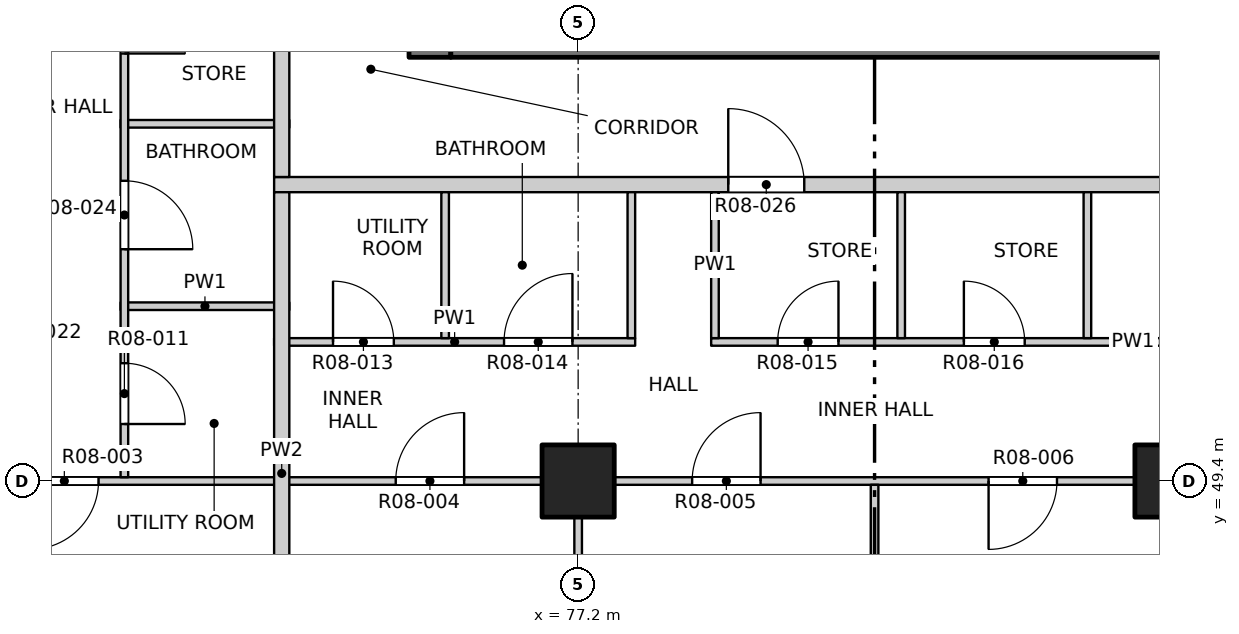
"""IFC4 building model, lengths in metres.
Left out: names, types, materials, properties, quantities, classifications, styles, units other than length and angle.
Written with IfcOpenShell. Run it as: python <this file> out.ifc"""

import sys

from ifc_helpers import new_model, si_unit, direction, frame, frame_2d, origin, origin_2d, place, context, subcontext, project, spatial, rectangle, extrude, element, fill, save


model = new_model("IFC4")
c1 = context("Model", 3, precision=1e-05, world=origin(), true_north=direction((0.0, 1.0)))
c2 = subcontext(c1, "Body", "Model", "MODEL_VIEW")
j1 = project(units=[si_unit("LENGTHUNIT", "METRE"), si_unit("PLANEANGLEUNIT", "RADIAN")], contexts=[c1])
p1 = place(None, origin())
s1 = spatial("IfcSite", under=j1, at=p1, CompositionType="ELEMENT")
p2 = place(p1, origin())
s2 = spatial("IfcBuilding", under=s1, at=p2, CompositionType="ELEMENT")
p3 = place(p2, frame((0.0, 0.0, 103.3)))
s3 = spatial("IfcBuildingStorey", under=s2, at=p3, CompositionType="ELEMENT", Elevation=103.3)
for number, where, z_axis, x_axis in (
    (1, (77.2, 49.4, -0.25), (0.0, 0.0, 1.0), (1.0, 0.0, 0.0)),
    (2, (85.0, 49.4, -0.25), (0.0, 0.0, 1.0), (1.0, 0.0, 0.0)),
):
    element("IfcColumn", number, at=place(p3, frame(where, z_axis=z_axis, x_axis=x_axis)), inside=s3, PredefinedType="COLUMN", context=c2, shape_type="SweptSolid", body=[
        extrude(rectangle(XDim=0.95, YDim=0.95, at=origin_2d()), origin(), (0.0, 0.0, 1.0), 3.4),
    ])
p4 = place(p3, frame((75.25, 54.975, -0.25), z_axis=(0.0, 0.0, 1.0), x_axis=(0.0, 1.0, 0.0)))
e3 = element("IfcWall", 3, at=p4, inside=s3, PredefinedType="SOLIDWALL", context=c2, shape_type="SweptSolid", body=[
    extrude(rectangle(XDim=22.325, YDim=0.55, at=frame_2d((11.163, 0.0))), origin(), (0.0, 0.0, 1.0), 3.4),
])
p5 = place(p4, frame((7.475, 0.0, 0.25)))
e4 = element("IfcOpeningElement", 4, at=p5, cuts=e3, PredefinedType="OPENING", context=c2, shape_type="SweptSolid", body=[
    extrude(rectangle(XDim=0.9, YDim=2.1, at=frame_2d((0.45, 1.05))), frame((0.0, 0.285, 0.0), z_axis=(0.0, -1.0, 0.0), x_axis=(1.0, 0.0, 0.0)), (0.0, 0.0, 1.0), 0.57),
])
p6 = place(p4, frame((10.775, 0.0, 0.25)))
e5 = element("IfcOpeningElement", 5, at=p6, cuts=e3, PredefinedType="OPENING", context=c2, shape_type="SweptSolid", body=[
    extrude(rectangle(XDim=0.9, YDim=2.1, at=frame_2d((0.45, 1.05))), frame((0.0, 0.285, 0.0), z_axis=(0.0, -1.0, 0.0), x_axis=(1.0, 0.0, 0.0)), (0.0, 0.0, 1.0), 0.57),
])
p7 = place(p4, frame((13.775, 0.0, 0.25)))
e6 = element("IfcOpeningElement", 6, at=p7, cuts=e3, PredefinedType="OPENING", context=c2, shape_type="SweptSolid", body=[
    extrude(rectangle(XDim=0.9, YDim=2.1, at=frame_2d((0.45, 1.05))), frame((0.0, 0.285, 0.0), z_axis=(0.0, -1.0, 0.0), x_axis=(1.0, 0.0, 0.0)), (0.0, 0.0, 1.0), 0.57),
])
p8 = place(p4, frame((16.775, 0.0, 0.25)))
e7 = element("IfcOpeningElement", 7, at=p8, cuts=e3, PredefinedType="OPENING", context=c2, shape_type="SweptSolid", body=[
    extrude(rectangle(XDim=0.9, YDim=2.1, at=frame_2d((0.45, 1.05))), frame((0.0, 0.285, 0.0), z_axis=(0.0, -1.0, 0.0), x_axis=(1.0, 0.0, 0.0)), (0.0, 0.0, 1.0), 0.57),
])
p9 = place(p4, frame((20.075, 0.0, 0.25)))
e8 = element("IfcOpeningElement", 8, at=p9, cuts=e3, PredefinedType="OPENING", context=c2, shape_type="SweptSolid", body=[
    extrude(rectangle(XDim=0.9, YDim=2.1, at=frame_2d((0.45, 1.05))), frame((0.0, 0.285, 0.0), z_axis=(0.0, -1.0, 0.0), x_axis=(1.0, 0.0, 0.0)), (0.0, 0.0, 1.0), 0.57),
])
p10 = place(p3, frame((75.525, 55.25, -0.25), z_axis=(0.0, 0.0, 1.0), x_axis=(1.0, 0.0, 0.0)))
e9 = element("IfcWall", 9, at=p10, inside=s3, PredefinedType="SOLIDWALL", context=c2, shape_type="SweptSolid", body=[
    extrude(rectangle(XDim=18.95, YDim=0.55, at=frame_2d((9.475, 0.0))), origin(), (0.0, 0.0, 1.0), 3.4),
])
p11 = place(p10, frame((8.725, 0.0, 0.25)))
e10 = element("IfcOpeningElement", 10, at=p11, cuts=e9, PredefinedType="OPENING", context=c2, shape_type="SweptSolid", body=[
    extrude(rectangle(XDim=1.5, YDim=2.1, at=frame_2d((0.75, 1.05))), frame((0.0, 0.285, 0.0), z_axis=(0.0, -1.0, 0.0), x_axis=(1.0, 0.0, 0.0)), (0.0, 0.0, 1.0), 0.57),
])
p12 = place(p3, frame((65.8, 49.4, 0.0), z_axis=(0.0, 0.0, 1.0), x_axis=(1.0, 0.0, 0.0)))
e11 = element("IfcWall", 11, at=p12, inside=s3, PredefinedType="PARTITIONING", context=c2, shape_type="SweptSolid", body=[
    extrude(rectangle(XDim=38.4, YDim=0.1, at=frame_2d((19.2, 0.0))), origin(), (0.0, 0.0, 1.0), 3.15),
])
p13 = place(p12, frame((4.19, 0.0, 0.0)))
e12 = element("IfcOpeningElement", 12, at=p13, cuts=e11, PredefinedType="OPENING", context=c2, shape_type="SweptSolid", body=[
    extrude(rectangle(XDim=0.9, YDim=2.1, at=frame_2d((0.45, 1.05))), frame((0.0, 0.06, 0.0), z_axis=(0.0, -1.0, 0.0), x_axis=(1.0, 0.0, 0.0)), (0.0, 0.0, 1.0), 0.12),
])
p14 = place(p12, frame((9.0, 0.0, 0.0)))
e13 = element("IfcOpeningElement", 13, at=p14, cuts=e11, PredefinedType="OPENING", context=c2, shape_type="SweptSolid", body=[
    extrude(rectangle(XDim=0.9, YDim=2.1, at=frame_2d((0.45, 1.05))), frame((0.0, 0.06, 0.0), z_axis=(0.0, -1.0, 0.0), x_axis=(1.0, 0.0, 0.0)), (0.0, 0.0, 1.0), 0.12),
])
p15 = place(p12, frame((12.9, 0.0, 0.0)))
e14 = element("IfcOpeningElement", 14, at=p15, cuts=e11, PredefinedType="OPENING", context=c2, shape_type="SweptSolid", body=[
    extrude(rectangle(XDim=0.9, YDim=2.1, at=frame_2d((0.45, 1.05))), frame((0.0, 0.06, 0.0), z_axis=(0.0, -1.0, 0.0), x_axis=(1.0, 0.0, 0.0)), (0.0, 0.0, 1.0), 0.12),
])
p16 = place(p12, frame((16.8, 0.0, 0.0)))
e15 = element("IfcOpeningElement", 15, at=p16, cuts=e11, PredefinedType="OPENING", context=c2, shape_type="SweptSolid", body=[
    extrude(rectangle(XDim=0.9, YDim=2.1, at=frame_2d((0.45, 1.05))), frame((0.0, 0.06, 0.0), z_axis=(0.0, -1.0, 0.0), x_axis=(1.0, 0.0, 0.0)), (0.0, 0.0, 1.0), 0.12),
])
p17 = place(p12, frame((20.7, 0.0, 0.0)))
e16 = element("IfcOpeningElement", 16, at=p17, cuts=e11, PredefinedType="OPENING", context=c2, shape_type="SweptSolid", body=[
    extrude(rectangle(XDim=0.9, YDim=2.1, at=frame_2d((0.45, 1.05))), frame((0.0, 0.06, 0.0), z_axis=(0.0, -1.0, 0.0), x_axis=(1.0, 0.0, 0.0)), (0.0, 0.0, 1.0), 0.12),
])
p18 = place(p12, frame((24.6, 0.0, 0.0)))
e17 = element("IfcOpeningElement", 17, at=p18, cuts=e11, PredefinedType="OPENING", context=c2, shape_type="SweptSolid", body=[
    extrude(rectangle(XDim=0.9, YDim=2.1, at=frame_2d((0.45, 1.05))), frame((0.0, 0.06, 0.0), z_axis=(0.0, -1.0, 0.0), x_axis=(1.0, 0.0, 0.0)), (0.0, 0.0, 1.0), 0.12),
])
p19 = place(p12, frame((28.5, 0.0, 0.0)))
e18 = element("IfcOpeningElement", 18, at=p19, cuts=e11, PredefinedType="OPENING", context=c2, shape_type="SweptSolid", body=[
    extrude(rectangle(XDim=0.9, YDim=2.1, at=frame_2d((0.45, 1.05))), frame((0.0, 0.06, 0.0), z_axis=(0.0, -1.0, 0.0), x_axis=(1.0, 0.0, 0.0)), (0.0, 0.0, 1.0), 0.12),
])
p20 = place(p12, frame((33.31, 0.0, 0.0)))
e19 = element("IfcOpeningElement", 19, at=p20, cuts=e11, PredefinedType="OPENING", context=c2, shape_type="SweptSolid", body=[
    extrude(rectangle(XDim=0.9, YDim=2.1, at=frame_2d((0.45, 1.05))), frame((0.0, 0.06, 0.0), z_axis=(0.0, -1.0, 0.0), x_axis=(1.0, 0.0, 0.0)), (0.0, 0.0, 1.0), 0.12),
])
p21 = place(p3, frame((73.2, 51.23, 0.0), z_axis=(0.0, 0.0, 1.0), x_axis=(1.0, 0.0, 0.0)))
e20 = element("IfcWall", 20, at=p21, inside=s3, PredefinedType="PARTITIONING", context=c2, shape_type="SweptSolid", body=[
    extrude(rectangle(XDim=4.75, YDim=0.1, at=frame_2d((2.375, 0.0))), origin(), (0.0, 0.0, 1.0), 3.15),
])
p22 = place(p21, frame((0.775, 0.0, 0.0)))
e21 = element("IfcOpeningElement", 21, at=p22, cuts=e20, PredefinedType="OPENING", context=c2, shape_type="SweptSolid", body=[
    extrude(rectangle(XDim=0.8, YDim=2.1, at=frame_2d((0.4, 1.05))), frame((0.0, 0.06, 0.0), z_axis=(0.0, -1.0, 0.0), x_axis=(1.0, 0.0, 0.0)), (0.0, 0.0, 1.0), 0.12),
])
p23 = place(p21, frame((3.025, 0.0, 0.0)))
e22 = element("IfcOpeningElement", 22, at=p23, cuts=e20, PredefinedType="OPENING", context=c2, shape_type="SweptSolid", body=[
    extrude(rectangle(XDim=0.9, YDim=2.1, at=frame_2d((0.45, 1.05))), frame((0.0, 0.06, 0.0), z_axis=(0.0, -1.0, 0.0), x_axis=(1.0, 0.0, 0.0)), (0.0, 0.0, 1.0), 0.12),
])
p24 = place(p3, frame((78.95, 51.23, 0.0), z_axis=(0.0, 0.0, 1.0), x_axis=(1.0, 0.0, 0.0)))
e23 = element("IfcWall", 23, at=p24, inside=s3, PredefinedType="PARTITIONING", context=c2, shape_type="SweptSolid", body=[
    extrude(rectangle(XDim=11.1, YDim=0.1, at=frame_2d((5.55, 0.0))), origin(), (0.0, 0.0, 1.0), 3.15),
])
p25 = place(p24, frame((0.875, 0.0, 0.0)))
e24 = element("IfcOpeningElement", 24, at=p25, cuts=e23, PredefinedType="OPENING", context=c2, shape_type="SweptSolid", body=[
    extrude(rectangle(XDim=0.8, YDim=2.1, at=frame_2d((0.4, 1.05))), frame((0.0, 0.06, 0.0), z_axis=(0.0, -1.0, 0.0), x_axis=(1.0, 0.0, 0.0)), (0.0, 0.0, 1.0), 0.12),
])
p26 = place(p24, frame((3.325, 0.0, 0.0)))
e25 = element("IfcOpeningElement", 25, at=p26, cuts=e23, PredefinedType="OPENING", context=c2, shape_type="SweptSolid", body=[
    extrude(rectangle(XDim=0.8, YDim=2.1, at=frame_2d((0.4, 1.05))), frame((0.0, 0.06, 0.0), z_axis=(0.0, -1.0, 0.0), x_axis=(1.0, 0.0, 0.0)), (0.0, 0.0, 1.0), 0.12),
])
p27 = place(p24, frame((6.035, 0.0, 0.0)))
e26 = element("IfcOpeningElement", 26, at=p27, cuts=e23, PredefinedType="OPENING", context=c2, shape_type="SweptSolid", body=[
    extrude(rectangle(XDim=0.9, YDim=2.1, at=frame_2d((0.45, 1.05))), frame((0.0, 0.06, 0.0), z_axis=(0.0, -1.0, 0.0), x_axis=(1.0, 0.0, 0.0)), (0.0, 0.0, 1.0), 0.12),
])
p28 = place(p24, frame((8.535, 0.0, 0.0)))
e27 = element("IfcOpeningElement", 27, at=p28, cuts=e23, PredefinedType="OPENING", context=c2, shape_type="SweptSolid", body=[
    extrude(rectangle(XDim=0.9, YDim=2.1, at=frame_2d((0.45, 1.05))), frame((0.0, 0.06, 0.0), z_axis=(0.0, -1.0, 0.0), x_axis=(1.0, 0.0, 0.0)), (0.0, 0.0, 1.0), 0.12),
])
p29 = place(p24, frame((10.1, 0.0, 0.0)))
e28 = element("IfcOpeningElement", 28, at=p29, cuts=e23, PredefinedType="OPENING", context=c2, shape_type="SweptSolid", body=[
    extrude(rectangle(XDim=0.8, YDim=2.1, at=frame_2d((0.4, 1.05))), frame((0.0, 0.06, 0.0), z_axis=(0.0, -1.0, 0.0), x_axis=(1.0, 0.0, 0.0)), (0.0, 0.0, 1.0), 0.12),
])
p30 = place(p3, frame((71.18, 51.7, 0.0), z_axis=(0.0, 0.0, 1.0), x_axis=(1.0, 0.0, 0.0)))
e29 = element("IfcWall", 29, at=p30, inside=s3, PredefinedType="PARTITIONING", context=c2, shape_type="SweptSolid", body=[
    extrude(rectangle(XDim=2.22, YDim=0.1, at=frame_2d((1.11, 0.0))), origin(), (0.0, 0.0, 1.0), 3.15),
])
p31 = place(p3, frame((73.2, 53.3, 0.0), z_axis=(0.0, 0.0, 1.0), x_axis=(1.0, 0.0, 0.0)))
e30 = element("IfcWall", 30, at=p31, inside=s3, PredefinedType="PARTITIONING", context=c2, shape_type="SweptSolid", body=[
    extrude(rectangle(XDim=23.6, YDim=0.2, at=frame_2d((11.8, 0.0))), origin(), (0.0, 0.0, 1.0), 3.15),
])
p32 = place(p31, frame((5.975, 0.0, 0.0)))
e31 = element("IfcOpeningElement", 31, at=p32, cuts=e30, PredefinedType="OPENING", context=c2, shape_type="SweptSolid", body=[
    extrude(rectangle(XDim=1.0, YDim=2.1, at=frame_2d((0.5, 1.05))), frame((0.0, 0.11, 0.0), z_axis=(0.0, -1.0, 0.0), x_axis=(1.0, 0.0, 0.0)), (0.0, 0.0, 1.0), 0.22),
])
p33 = place(p31, frame((18.075, 0.0, 0.0)))
e32 = element("IfcOpeningElement", 32, at=p33, cuts=e30, PredefinedType="OPENING", context=c2, shape_type="SweptSolid", body=[
    extrude(rectangle(XDim=1.0, YDim=2.1, at=frame_2d((0.5, 1.05))), frame((0.0, 0.11, 0.0), z_axis=(0.0, -1.0, 0.0), x_axis=(1.0, 0.0, 0.0)), (0.0, 0.0, 1.0), 0.22),
])
p34 = place(p3, frame((71.18, 54.1, 0.0), z_axis=(0.0, 0.0, 1.0), x_axis=(1.0, 0.0, 0.0)))
e33 = element("IfcWall", 33, at=p34, inside=s3, PredefinedType="PARTITIONING", context=c2, shape_type="SweptSolid", body=[
    extrude(rectangle(XDim=2.22, YDim=0.1, at=frame_2d((1.11, 0.0))), origin(), (0.0, 0.0, 1.0), 3.15),
])
p35 = place(p3, frame((71.23, 49.45, 0.0), z_axis=(0.0, 0.0, 1.0), x_axis=(0.0, 1.0, 0.0)))
e34 = element("IfcWall", 34, at=p35, inside=s3, PredefinedType="PARTITIONING", context=c2, shape_type="SweptSolid", body=[
    extrude(rectangle(XDim=9.05, YDim=0.1, at=frame_2d((4.525, 0.0))), origin(), (0.0, 0.0, 1.0), 3.15),
])
p36 = place(p35, frame((0.7, 0.0, 0.0)))
e35 = element("IfcOpeningElement", 35, at=p36, cuts=e34, PredefinedType="OPENING", context=c2, shape_type="SweptSolid", body=[
    extrude(rectangle(XDim=0.8, YDim=2.1, at=frame_2d((0.4, 1.05))), frame((0.0, 0.06, 0.0), z_axis=(0.0, -1.0, 0.0), x_axis=(1.0, 0.0, 0.0)), (0.0, 0.0, 1.0), 0.12),
])
p37 = place(p35, frame((3.0, 0.0, 0.0)))
e36 = element("IfcOpeningElement", 36, at=p37, cuts=e34, PredefinedType="OPENING", context=c2, shape_type="SweptSolid", body=[
    extrude(rectangle(XDim=0.9, YDim=2.1, at=frame_2d((0.45, 1.05))), frame((0.0, 0.06, 0.0), z_axis=(0.0, -1.0, 0.0), x_axis=(1.0, 0.0, 0.0)), (0.0, 0.0, 1.0), 0.12),
])
p38 = place(p35, frame((5.575, 0.0, 0.0)))
e37 = element("IfcOpeningElement", 37, at=p38, cuts=e34, PredefinedType="OPENING", context=c2, shape_type="SweptSolid", body=[
    extrude(rectangle(XDim=0.8, YDim=2.1, at=frame_2d((0.4, 1.05))), frame((0.0, 0.06, 0.0), z_axis=(0.0, -1.0, 0.0), x_axis=(1.0, 0.0, 0.0)), (0.0, 0.0, 1.0), 0.12),
])
p39 = place(p35, frame((7.75, 0.0, 0.0)))
e38 = element("IfcOpeningElement", 38, at=p39, cuts=e34, PredefinedType="OPENING", context=c2, shape_type="SweptSolid", body=[
    extrude(rectangle(XDim=0.9, YDim=2.1, at=frame_2d((0.45, 1.05))), frame((0.0, 0.06, 0.0), z_axis=(0.0, -1.0, 0.0), x_axis=(1.0, 0.0, 0.0)), (0.0, 0.0, 1.0), 0.12),
])
p40 = place(p3, frame((73.3, 45.8, 0.0), z_axis=(0.0, 0.0, 1.0), x_axis=(0.0, 1.0, 0.0)))
e39 = element("IfcWall", 39, at=p40, inside=s3, PredefinedType="PARTITIONING", context=c2, shape_type="SweptSolid", body=[
    extrude(rectangle(XDim=7.4, YDim=0.2, at=frame_2d((3.7, 0.0))), origin(), (0.0, 0.0, 1.0), 3.15),
])
p41 = place(p3, frame((73.3, 53.4, 0.0), z_axis=(0.0, 0.0, 1.0), x_axis=(0.0, 1.0, 0.0)))
e40 = element("IfcWall", 40, at=p41, inside=s3, PredefinedType="PARTITIONING", context=c2, shape_type="SweptSolid", body=[
    extrude(rectangle(XDim=30.8, YDim=0.2, at=frame_2d((15.4, 0.0))), origin(), (0.0, 0.0, 1.0), 3.15),
])
p42 = place(p41, frame((6.425, 0.0, 0.0)))
e41 = element("IfcOpeningElement", 41, at=p42, cuts=e40, PredefinedType="OPENING", context=c2, shape_type="SweptSolid", body=[
    extrude(rectangle(XDim=1.0, YDim=2.1, at=frame_2d((0.5, 1.05))), frame((0.0, 0.11, 0.0), z_axis=(0.0, -1.0, 0.0), x_axis=(1.0, 0.0, 0.0)), (0.0, 0.0, 1.0), 0.22),
])
p43 = place(p41, frame((18.525, 0.0, 0.0)))
e42 = element("IfcOpeningElement", 42, at=p43, cuts=e40, PredefinedType="OPENING", context=c2, shape_type="SweptSolid", body=[
    extrude(rectangle(XDim=1.0, YDim=2.1, at=frame_2d((0.5, 1.05))), frame((0.0, 0.11, 0.0), z_axis=(0.0, -1.0, 0.0), x_axis=(1.0, 0.0, 0.0)), (0.0, 0.0, 1.0), 0.22),
])
p44 = place(p3, frame((75.45, 51.28, 0.0), z_axis=(0.0, 0.0, 1.0), x_axis=(0.0, 1.0, 0.0)))
e43 = element("IfcWall", 43, at=p44, inside=s3, PredefinedType="PARTITIONING", context=c2, shape_type="SweptSolid", body=[
    extrude(rectangle(XDim=1.92, YDim=0.1, at=frame_2d((0.96, 0.0))), origin(), (0.0, 0.0, 1.0), 3.15),
])
p45 = place(p3, frame((77.2, 45.8, 0.0), z_axis=(0.0, 0.0, 1.0), x_axis=(0.0, 1.0, 0.0)))
e44 = element("IfcWall", 44, at=p45, inside=s3, PredefinedType="PARTITIONING", context=c2, shape_type="SweptSolid", body=[
    extrude(rectangle(XDim=3.55, YDim=0.1, at=frame_2d((1.775, 0.0))), origin(), (0.0, 0.0, 1.0), 3.15),
])
for number, where, z_axis, x_axis in (
    (45, (77.9, 51.28, 0.0), (0.0, 0.0, 1.0), (0.0, 1.0, 0.0)),
    (46, (79.0, 51.28, 0.0), (0.0, 0.0, 1.0), (0.0, 1.0, 0.0)),
):
    element("IfcWall", number, at=place(p3, frame(where, z_axis=z_axis, x_axis=x_axis)), inside=s3, PredefinedType="PARTITIONING", context=c2, shape_type="SweptSolid", body=[
        extrude(rectangle(XDim=1.92, YDim=0.1, at=frame_2d((0.96, 0.0))), origin(), (0.0, 0.0, 1.0), 3.15),
    ])
p46 = place(p3, frame((81.1, 45.8, 0.0), z_axis=(0.0, 0.0, 1.0), x_axis=(0.0, 1.0, 0.0)))
e47 = element("IfcWall", 47, at=p46, inside=s3, PredefinedType="PARTITIONING", context=c2, shape_type="SweptSolid", body=[
    extrude(rectangle(XDim=3.55, YDim=0.1, at=frame_2d((1.775, 0.0))), origin(), (0.0, 0.0, 1.0), 2.55),
])
for number, where, z_axis, x_axis in (
    (48, (81.45, 51.28, 0.0), (0.0, 0.0, 1.0), (0.0, 1.0, 0.0)),
    (49, (83.9, 51.28, 0.0), (0.0, 0.0, 1.0), (0.0, 1.0, 0.0)),
):
    element("IfcWall", number, at=place(p3, frame(where, z_axis=z_axis, x_axis=x_axis)), inside=s3, PredefinedType="PARTITIONING", context=c2, shape_type="SweptSolid", body=[
        extrude(rectangle(XDim=1.92, YDim=0.1, at=frame_2d((0.96, 0.0))), origin(), (0.0, 0.0, 1.0), 3.15),
    ])
p47 = place(p13, origin())
e50 = element("IfcDoor", 50, at=p47, inside=s3, OperationType="SINGLE_SWING_RIGHT", PredefinedType="DOOR", context=c2, shape_type="SweptSolid", body=[
    extrude(rectangle(XDim=0.9, YDim=2.1, at=frame_2d((0.45, 1.05))), frame((0.0, 0.025, 0.0), z_axis=(0.0, -1.0, 0.0), x_axis=(1.0, 0.0, 0.0)), (0.0, 0.0, 1.0), 0.05),
])
fill(e12, e50)
p48 = place(p14, origin())
e51 = element("IfcDoor", 51, at=p48, inside=s3, OperationType="SINGLE_SWING_RIGHT", PredefinedType="DOOR", context=c2, shape_type="SweptSolid", body=[
    extrude(rectangle(XDim=0.9, YDim=2.1, at=frame_2d((0.45, 1.05))), frame((0.0, 0.025, 0.0), z_axis=(0.0, -1.0, 0.0), x_axis=(1.0, 0.0, 0.0)), (0.0, 0.0, 1.0), 0.05),
])
fill(e13, e51)
p49 = place(p15, origin())
e52 = element("IfcDoor", 52, at=p49, inside=s3, OperationType="SINGLE_SWING_RIGHT", PredefinedType="DOOR", context=c2, shape_type="SweptSolid", body=[
    extrude(rectangle(XDim=0.9, YDim=2.1, at=frame_2d((0.45, 1.05))), frame((0.0, 0.025, 0.0), z_axis=(0.0, -1.0, 0.0), x_axis=(1.0, 0.0, 0.0)), (0.0, 0.0, 1.0), 0.05),
])
fill(e14, e52)
p50 = place(p16, origin())
e53 = element("IfcDoor", 53, at=p50, inside=s3, OperationType="SINGLE_SWING_RIGHT", PredefinedType="DOOR", context=c2, shape_type="SweptSolid", body=[
    extrude(rectangle(XDim=0.9, YDim=2.1, at=frame_2d((0.45, 1.05))), frame((0.0, 0.025, 0.0), z_axis=(0.0, -1.0, 0.0), x_axis=(1.0, 0.0, 0.0)), (0.0, 0.0, 1.0), 0.05),
])
fill(e15, e53)
p51 = place(p36, origin())
e54 = element("IfcDoor", 54, at=p51, inside=s3, OperationType="SINGLE_SWING_RIGHT", PredefinedType="DOOR", context=c2, shape_type="SweptSolid", body=[
    extrude(rectangle(XDim=0.8, YDim=2.1, at=frame_2d((0.4, 1.05))), frame((0.0, 0.025, 0.0), z_axis=(0.0, -1.0, 0.0), x_axis=(1.0, 0.0, 0.0)), (0.0, 0.0, 1.0), 0.05),
])
fill(e35, e54)
p52 = place(p22, origin())
e55 = element("IfcDoor", 55, at=p52, inside=s3, OperationType="SINGLE_SWING_LEFT", PredefinedType="DOOR", context=c2, shape_type="SweptSolid", body=[
    extrude(rectangle(XDim=0.8, YDim=2.1, at=frame_2d((0.4, 1.05))), frame((0.0, 0.025, 0.0), z_axis=(0.0, -1.0, 0.0), x_axis=(1.0, 0.0, 0.0)), (0.0, 0.0, 1.0), 0.05),
])
fill(e21, e55)
p53 = place(p23, origin())
e56 = element("IfcDoor", 56, at=p53, inside=s3, OperationType="SINGLE_SWING_RIGHT", PredefinedType="DOOR", context=c2, shape_type="SweptSolid", body=[
    extrude(rectangle(XDim=0.9, YDim=2.1, at=frame_2d((0.45, 1.05))), frame((0.0, 0.025, 0.0), z_axis=(0.0, -1.0, 0.0), x_axis=(1.0, 0.0, 0.0)), (0.0, 0.0, 1.0), 0.05),
])
fill(e22, e56)
p54 = place(p25, origin())
e57 = element("IfcDoor", 57, at=p54, inside=s3, OperationType="SINGLE_SWING_RIGHT", PredefinedType="DOOR", context=c2, shape_type="SweptSolid", body=[
    extrude(rectangle(XDim=0.8, YDim=2.1, at=frame_2d((0.4, 1.05))), frame((0.0, 0.025, 0.0), z_axis=(0.0, -1.0, 0.0), x_axis=(1.0, 0.0, 0.0)), (0.0, 0.0, 1.0), 0.05),
])
fill(e24, e57)
p55 = place(p26, origin())
e58 = element("IfcDoor", 58, at=p55, inside=s3, OperationType="SINGLE_SWING_LEFT", PredefinedType="DOOR", context=c2, shape_type="SweptSolid", body=[
    extrude(rectangle(XDim=0.8, YDim=2.1, at=frame_2d((0.4, 1.05))), frame((0.0, 0.025, 0.0), z_axis=(0.0, -1.0, 0.0), x_axis=(1.0, 0.0, 0.0)), (0.0, 0.0, 1.0), 0.05),
])
fill(e25, e58)
p56 = place(p37, origin())
e59 = element("IfcDoor", 59, at=p56, inside=s3, OperationType="SINGLE_SWING_RIGHT", PredefinedType="DOOR", context=c2, shape_type="SweptSolid", body=[
    extrude(rectangle(XDim=0.9, YDim=2.1, at=frame_2d((0.45, 1.05))), frame((0.0, 0.025, 0.0), z_axis=(0.0, -1.0, 0.0), x_axis=(1.0, 0.0, 0.0)), (0.0, 0.0, 1.0), 0.05),
])
fill(e36, e59)
p57 = place(p32, origin())
e60 = element("IfcDoor", 60, at=p57, inside=s3, OperationType="SINGLE_SWING_LEFT", PredefinedType="DOOR", context=c2, shape_type="SweptSolid", body=[
    extrude(rectangle(XDim=1.0, YDim=2.1, at=frame_2d((0.5, 1.05))), frame((0.0, 0.025, 0.0), z_axis=(0.0, -1.0, 0.0), x_axis=(1.0, 0.0, 0.0)), (0.0, 0.0, 1.0), 0.05),
])
fill(e31, e60)
p58 = place(p38, origin())
e61 = element("IfcDoor", 61, at=p58, inside=s3, OperationType="SINGLE_SWING_RIGHT", PredefinedType="DOOR", context=c2, shape_type="SweptSolid", body=[
    extrude(rectangle(XDim=0.8, YDim=2.1, at=frame_2d((0.4, 1.05))), frame((0.0, 0.025, 0.0), z_axis=(0.0, -1.0, 0.0), x_axis=(1.0, 0.0, 0.0)), (0.0, 0.0, 1.0), 0.05),
])
fill(e37, e61)
save(model, sys.argv[1])
